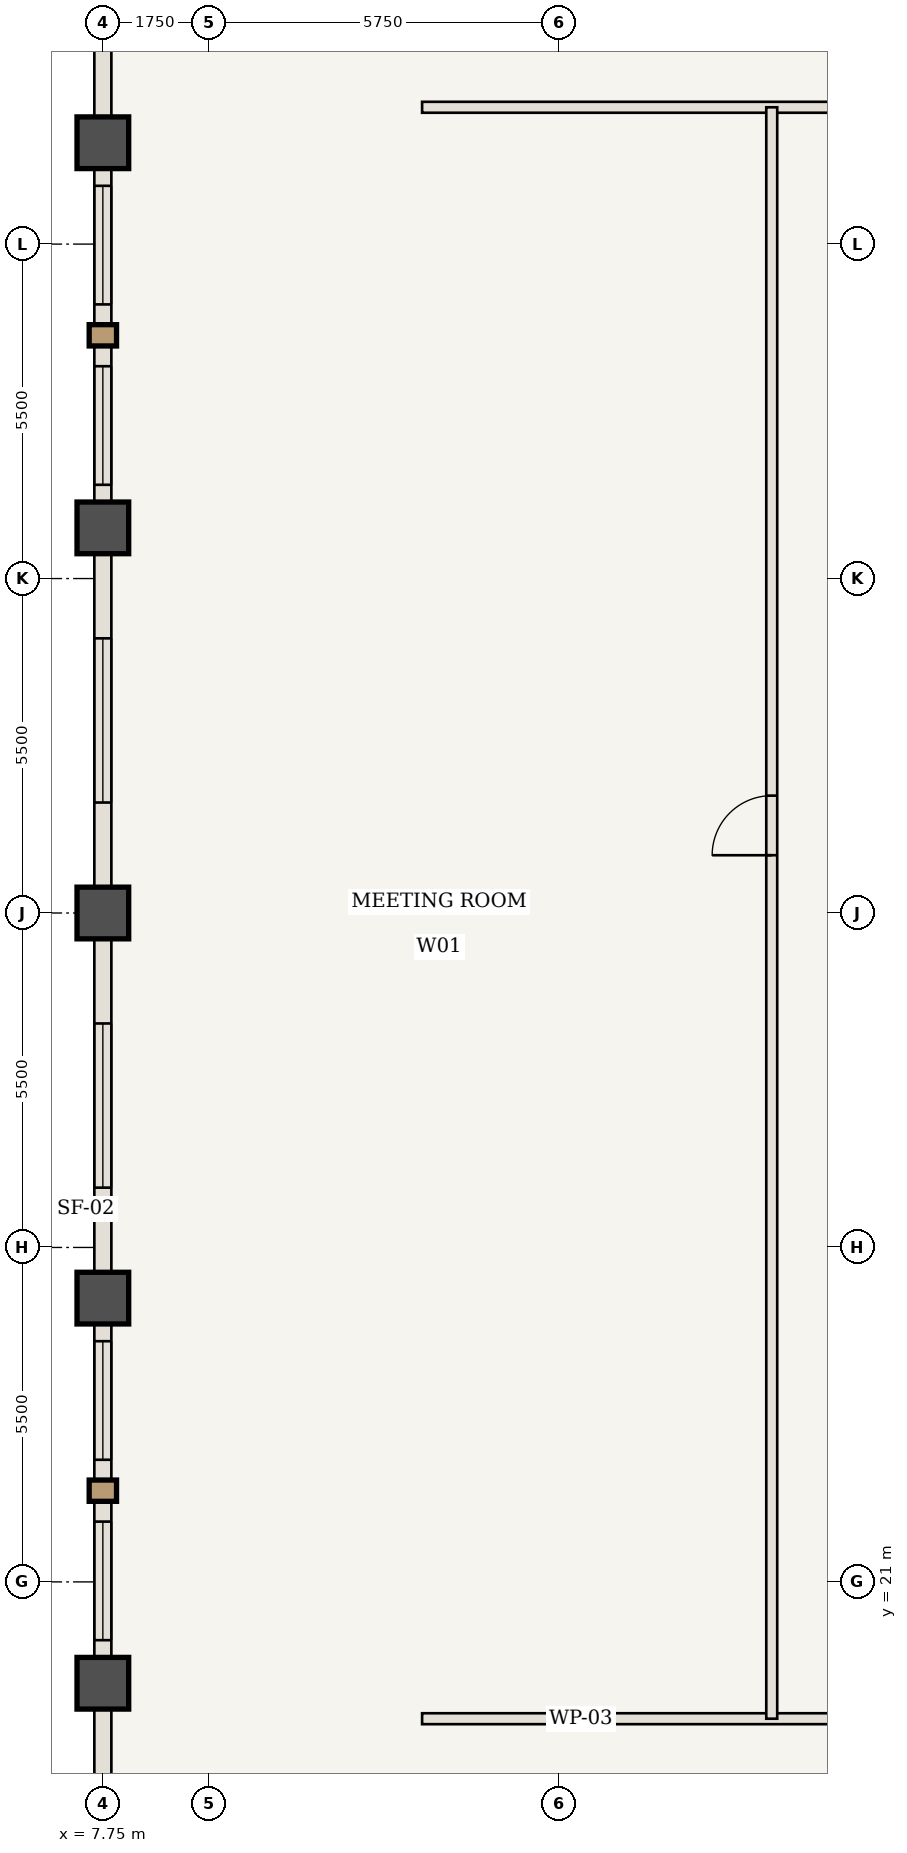
"""IFC4 building model, lengths in metres.
Left out: names, types, materials, properties, quantities, classifications, styles, units other than length and angle.
Written with IfcOpenShell. Run it as: python <this file> out.ifc"""

import sys

from ifc_helpers import new_model, si_unit, direction, frame, frame_2d, origin, origin_2d, place, context, subcontext, project, spatial, rectangle, extrude, element, fill, save


model = new_model("IFC4")
c1 = context("Model", 3, precision=1e-05, world=origin(), true_north=direction((0.0, 1.0)))
c2 = subcontext(c1, "Body", "Model", "MODEL_VIEW")
j1 = project(units=[si_unit("LENGTHUNIT", "METRE"), si_unit("PLANEANGLEUNIT", "RADIAN")], contexts=[c1])
p1 = place(None, origin())
s1 = spatial("IfcSite", under=j1, at=p1, CompositionType="ELEMENT")
p2 = place(p1, origin())
s2 = spatial("IfcBuilding", under=s1, at=p2, CompositionType="ELEMENT")
p3 = place(p2, frame((0.0, 0.0, 236.95)))
s3 = spatial("IfcBuildingStorey", under=s2, at=p3, CompositionType="ELEMENT", Elevation=236.95)
for number, where, z_axis, x_axis in (
    (1, (7.75, 19.333, 0.0), (0.0, 0.0, 1.0), (1.0, 0.0, 0.0)),
    (2, (7.75, 25.667, 0.0), (0.0, 0.0, 1.0), (1.0, 0.0, 0.0)),
    (3, (7.75, 32.0, 0.0), (0.0, 0.0, 1.0), (1.0, 0.0, 0.0)),
    (4, (7.75, 38.333, 0.0), (0.0, 0.0, 1.0), (1.0, 0.0, 0.0)),
    (5, (7.75, 44.667, 0.0), (0.0, 0.0, 1.0), (1.0, 0.0, 0.0)),
):
    element("IfcColumn", number, at=place(p3, frame(where, z_axis=z_axis, x_axis=x_axis)), inside=s3, PredefinedType="COLUMN", context=c2, shape_type="SweptSolid", body=[
        extrude(rectangle(XDim=0.85, YDim=0.85, at=origin_2d()), origin(), (0.0, 0.0, 1.0), 3.85),
    ])
p4 = place(p3, frame((13.0, 18.75, 0.0), z_axis=(0.0, 0.0, 1.0), x_axis=(1.0, 0.0, 0.0)))
e6 = element("IfcWall", 6, at=p4, inside=s3, PredefinedType="STANDARD", context=c2, shape_type="SweptSolid", body=[
    extrude(rectangle(XDim=11.867, YDim=0.18, at=frame_2d((5.933, 0.0))), origin(), (0.0, 0.0, 1.0), 3.685),
])
p5 = place(p4, frame((6.858, 0.0, 0.0)))
e7 = element("IfcOpeningElement", 7, at=p5, cuts=e6, PredefinedType="OPENING", context=c2, shape_type="SweptSolid", body=[
    extrude(rectangle(XDim=0.98, YDim=2.2, at=frame_2d((0.49, 1.1))), frame((0.0, 0.1, 0.0), z_axis=(0.0, -1.0, 0.0), x_axis=(1.0, 0.0, 0.0)), (0.0, 0.0, 1.0), 0.2),
])
p6 = place(p3, frame((13.0, 45.25, 0.0), z_axis=(0.0, 0.0, 1.0), x_axis=(1.0, 0.0, 0.0)))
e8 = element("IfcWall", 8, at=p6, inside=s3, PredefinedType="STANDARD", context=c2, shape_type="SweptSolid", body=[
    extrude(rectangle(XDim=19.6, YDim=0.18, at=frame_2d((9.8, 0.0))), origin(), (0.0, 0.0, 1.0), 3.685),
])
p7 = place(p6, frame((12.175, 0.0, 0.0)))
e9 = element("IfcOpeningElement", 9, at=p7, cuts=e8, PredefinedType="OPENING", context=c2, shape_type="SweptSolid", body=[
    extrude(rectangle(XDim=0.98, YDim=2.2, at=frame_2d((0.49, 1.1))), frame((0.0, 0.1, 0.0), z_axis=(0.0, -1.0, 0.0), x_axis=(1.0, 0.0, 0.0)), (0.0, 0.0, 1.0), 0.2),
])
p8 = place(p3, frame((18.75, 18.75, 0.0), z_axis=(0.0, 0.0, 1.0), x_axis=(0.0, 1.0, 0.0)))
e10 = element("IfcWall", 10, at=p8, inside=s3, PredefinedType="STANDARD", context=c2, shape_type="SweptSolid", body=[
    extrude(rectangle(XDim=26.5, YDim=0.18, at=frame_2d((13.25, 0.0))), origin(), (0.0, 0.0, 1.0), 3.685),
])
p9 = place(p8, frame((14.2, 0.0, 0.0)))
e11 = element("IfcOpeningElement", 11, at=p9, cuts=e10, PredefinedType="OPENING", context=c2, shape_type="SweptSolid", body=[
    extrude(rectangle(XDim=0.98, YDim=2.2, at=frame_2d((0.49, 1.1))), frame((0.0, 0.1, 0.0), z_axis=(0.0, -1.0, 0.0), x_axis=(1.0, 0.0, 0.0)), (0.0, 0.0, 1.0), 0.2),
])
p10 = place(p3, frame((7.75, 13.0, 0.0), z_axis=(0.0, 0.0, 1.0), x_axis=(0.0, 1.0, 0.0)))
e12 = element("IfcWall", 12, at=p10, inside=s3, PredefinedType="USERDEFINED", context=c2, shape_type="SweptSolid", body=[
    extrude(rectangle(XDim=6.333, YDim=0.28, at=frame_2d((3.167, 0.0))), origin(), (0.0, 0.0, 1.0), 2.985),
])
p11 = place(p3, frame((7.75, 19.333, 0.0), z_axis=(0.0, 0.0, 1.0), x_axis=(0.0, 1.0, 0.0)))
e13 = element("IfcWall", 13, at=p11, inside=s3, PredefinedType="USERDEFINED", context=c2, shape_type="SweptSolid", body=[
    extrude(rectangle(XDim=6.333, YDim=0.28, at=frame_2d((3.167, 0.0))), origin(), (0.0, 0.0, 1.0), 2.985),
])
p12 = place(p11, frame((0.708, 0.0, 0.85)))
e14 = element("IfcOpeningElement", 14, at=p12, cuts=e13, PredefinedType="OPENING", context=c2, shape_type="SweptSolid", body=[
    extrude(rectangle(XDim=1.95, YDim=1.935, at=frame_2d((0.975, 0.968))), frame((0.0, 0.15, 0.0), z_axis=(0.0, -1.0, 0.0), x_axis=(1.0, 0.0, 0.0)), (0.0, 0.0, 1.0), 0.3),
])
p13 = place(p11, frame((3.675, 0.0, 0.85)))
e15 = element("IfcOpeningElement", 15, at=p13, cuts=e13, PredefinedType="OPENING", context=c2, shape_type="SweptSolid", body=[
    extrude(rectangle(XDim=1.95, YDim=1.935, at=frame_2d((0.975, 0.968))), frame((0.0, 0.15, 0.0), z_axis=(0.0, -1.0, 0.0), x_axis=(1.0, 0.0, 0.0)), (0.0, 0.0, 1.0), 0.3),
])
p14 = place(p3, frame((7.75, 25.667, 0.0), z_axis=(0.0, 0.0, 1.0), x_axis=(0.0, 1.0, 0.0)))
e16 = element("IfcWall", 16, at=p14, inside=s3, PredefinedType="USERDEFINED", context=c2, shape_type="SweptSolid", body=[
    extrude(rectangle(XDim=6.333, YDim=0.28, at=frame_2d((3.167, 0.0))), origin(), (0.0, 0.0, 1.0), 2.985),
])
p15 = place(p14, frame((1.817, 0.0, 0.85)))
e17 = element("IfcOpeningElement", 17, at=p15, cuts=e16, PredefinedType="OPENING", context=c2, shape_type="SweptSolid", body=[
    extrude(rectangle(XDim=2.7, YDim=1.935, at=frame_2d((1.35, 0.968))), frame((0.0, 0.15, 0.0), z_axis=(0.0, -1.0, 0.0), x_axis=(1.0, 0.0, 0.0)), (0.0, 0.0, 1.0), 0.3),
])
p16 = place(p3, frame((7.75, 32.0, 0.0), z_axis=(0.0, 0.0, 1.0), x_axis=(0.0, 1.0, 0.0)))
e18 = element("IfcWall", 18, at=p16, inside=s3, PredefinedType="USERDEFINED", context=c2, shape_type="SweptSolid", body=[
    extrude(rectangle(XDim=6.333, YDim=0.28, at=frame_2d((3.167, 0.0))), origin(), (0.0, 0.0, 1.0), 2.985),
])
p17 = place(p16, frame((1.817, 0.0, 0.85)))
e19 = element("IfcOpeningElement", 19, at=p17, cuts=e18, PredefinedType="OPENING", context=c2, shape_type="SweptSolid", body=[
    extrude(rectangle(XDim=2.7, YDim=1.935, at=frame_2d((1.35, 0.968))), frame((0.0, 0.15, 0.0), z_axis=(0.0, -1.0, 0.0), x_axis=(1.0, 0.0, 0.0)), (0.0, 0.0, 1.0), 0.3),
])
p18 = place(p3, frame((7.75, 38.333, 0.0), z_axis=(0.0, 0.0, 1.0), x_axis=(0.0, 1.0, 0.0)))
e20 = element("IfcWall", 20, at=p18, inside=s3, PredefinedType="USERDEFINED", context=c2, shape_type="SweptSolid", body=[
    extrude(rectangle(XDim=6.333, YDim=0.28, at=frame_2d((3.167, 0.0))), origin(), (0.0, 0.0, 1.0), 2.985),
])
p19 = place(p18, frame((0.708, 0.0, 0.85)))
e21 = element("IfcOpeningElement", 21, at=p19, cuts=e20, PredefinedType="OPENING", context=c2, shape_type="SweptSolid", body=[
    extrude(rectangle(XDim=1.95, YDim=1.935, at=frame_2d((0.975, 0.968))), frame((0.0, 0.15, 0.0), z_axis=(0.0, -1.0, 0.0), x_axis=(1.0, 0.0, 0.0)), (0.0, 0.0, 1.0), 0.3),
])
p20 = place(p18, frame((3.675, 0.0, 0.85)))
e22 = element("IfcOpeningElement", 22, at=p20, cuts=e20, PredefinedType="OPENING", context=c2, shape_type="SweptSolid", body=[
    extrude(rectangle(XDim=1.95, YDim=1.935, at=frame_2d((0.975, 0.968))), frame((0.0, 0.15, 0.0), z_axis=(0.0, -1.0, 0.0), x_axis=(1.0, 0.0, 0.0)), (0.0, 0.0, 1.0), 0.3),
])
p21 = place(p3, frame((7.75, 44.667, 0.0), z_axis=(0.0, 0.0, 1.0), x_axis=(0.0, 1.0, 0.0)))
e23 = element("IfcWall", 23, at=p21, inside=s3, PredefinedType="USERDEFINED", context=c2, shape_type="SweptSolid", body=[
    extrude(rectangle(XDim=6.333, YDim=0.28, at=frame_2d((3.167, 0.0))), origin(), (0.0, 0.0, 1.0), 2.985),
])
p22 = place(p9, origin())
e24 = element("IfcDoor", 24, at=p22, inside=s3, OperationType="SINGLE_SWING_LEFT", PredefinedType="DOOR", context=c2, shape_type="SweptSolid", body=[
    extrude(rectangle(XDim=0.98, YDim=2.2, at=frame_2d((0.49, 1.1))), frame((0.0, 0.025, 0.0), z_axis=(0.0, -1.0, 0.0), x_axis=(1.0, 0.0, 0.0)), (0.0, 0.0, 1.0), 0.05),
])
fill(e11, e24)
p23 = place(p12, origin())
e25 = element("IfcWindow", 25, at=p23, inside=s3, PartitioningType="SINGLE_PANEL", PredefinedType="WINDOW", context=c2, shape_type="SweptSolid", body=[
    extrude(rectangle(XDim=1.95, YDim=1.935, at=frame_2d((0.975, 0.968))), frame((0.0, 0.03, 0.0), z_axis=(0.0, -1.0, 0.0), x_axis=(1.0, 0.0, 0.0)), (0.0, 0.0, 1.0), 0.06),
])
fill(e14, e25)
p24 = place(p13, origin())
e26 = element("IfcWindow", 26, at=p24, inside=s3, PartitioningType="SINGLE_PANEL", PredefinedType="WINDOW", context=c2, shape_type="SweptSolid", body=[
    extrude(rectangle(XDim=1.95, YDim=1.935, at=frame_2d((0.975, 0.968))), frame((0.0, 0.03, 0.0), z_axis=(0.0, -1.0, 0.0), x_axis=(1.0, 0.0, 0.0)), (0.0, 0.0, 1.0), 0.06),
])
fill(e15, e26)
p25 = place(p15, origin())
e27 = element("IfcWindow", 27, at=p25, inside=s3, PartitioningType="SINGLE_PANEL", PredefinedType="WINDOW", context=c2, shape_type="SweptSolid", body=[
    extrude(rectangle(XDim=2.7, YDim=1.935, at=frame_2d((1.35, 0.968))), frame((0.0, 0.03, 0.0), z_axis=(0.0, -1.0, 0.0), x_axis=(1.0, 0.0, 0.0)), (0.0, 0.0, 1.0), 0.06),
])
fill(e17, e27)
p26 = place(p17, origin())
e28 = element("IfcWindow", 28, at=p26, inside=s3, PartitioningType="SINGLE_PANEL", PredefinedType="WINDOW", context=c2, shape_type="SweptSolid", body=[
    extrude(rectangle(XDim=2.7, YDim=1.935, at=frame_2d((1.35, 0.968))), frame((0.0, 0.03, 0.0), z_axis=(0.0, -1.0, 0.0), x_axis=(1.0, 0.0, 0.0)), (0.0, 0.0, 1.0), 0.06),
])
fill(e19, e28)
p27 = place(p19, origin())
e29 = element("IfcWindow", 29, at=p27, inside=s3, PartitioningType="SINGLE_PANEL", PredefinedType="WINDOW", context=c2, shape_type="SweptSolid", body=[
    extrude(rectangle(XDim=1.95, YDim=1.935, at=frame_2d((0.975, 0.968))), frame((0.0, 0.03, 0.0), z_axis=(0.0, -1.0, 0.0), x_axis=(1.0, 0.0, 0.0)), (0.0, 0.0, 1.0), 0.06),
])
fill(e21, e29)
p28 = place(p20, origin())
e30 = element("IfcWindow", 30, at=p28, inside=s3, PartitioningType="SINGLE_PANEL", PredefinedType="WINDOW", context=c2, shape_type="SweptSolid", body=[
    extrude(rectangle(XDim=1.95, YDim=1.935, at=frame_2d((0.975, 0.968))), frame((0.0, 0.03, 0.0), z_axis=(0.0, -1.0, 0.0), x_axis=(1.0, 0.0, 0.0)), (0.0, 0.0, 1.0), 0.06),
])
fill(e22, e30)
save(model, sys.argv[1])
